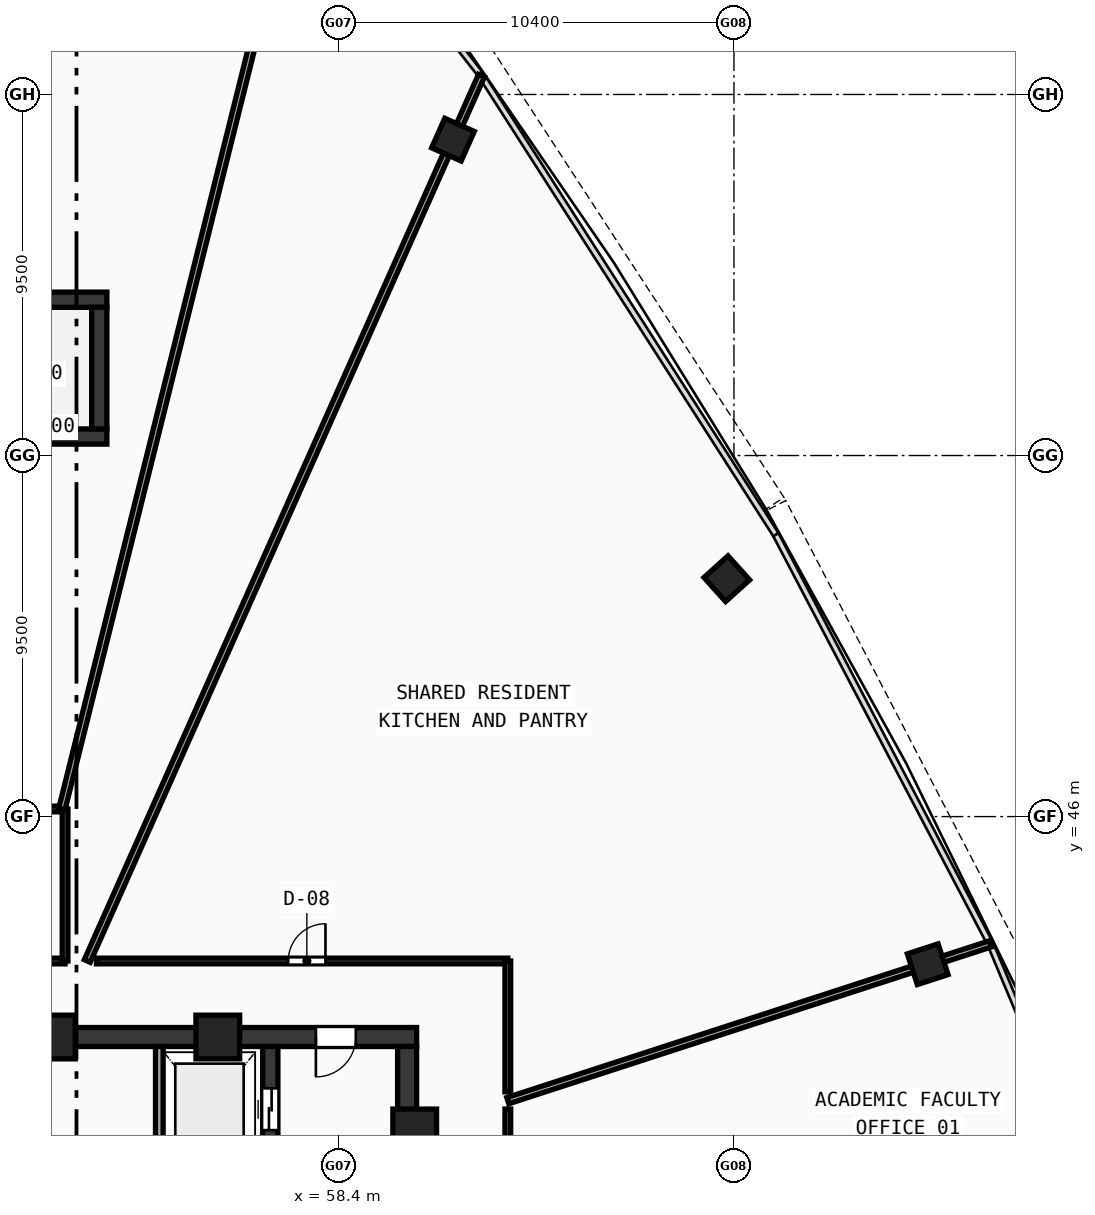
"""IFC4 building model, lengths in metres.
Left out: names, types, materials, properties, quantities, classifications, styles, units other than length and angle.
Written with IfcOpenShell. Run it as: python <this file> out.ifc"""

import sys

from ifc_helpers import new_model, si_unit, direction, frame, frame_2d, origin, origin_with_axes, origin_2d, place, context, subcontext, project, spatial, rectangle, hollow_rectangle, extrude, source, transform, mapped, element, fill, save


model = new_model("IFC4")
c1 = context("Model", 3, precision=1e-05, world=origin(), true_north=direction((0.0, 1.0)))
c2 = subcontext(c1, "Body", "Model", "MODEL_VIEW")
j1 = project(units=[si_unit("LENGTHUNIT", "METRE"), si_unit("PLANEANGLEUNIT", "RADIAN")], contexts=[c1])
p1 = place(None, origin())
s1 = spatial("IfcSite", under=j1, at=p1, CompositionType="ELEMENT")
p2 = place(p1, origin())
s2 = spatial("IfcBuilding", under=s1, at=p2, CompositionType="ELEMENT")
p3 = place(p2, frame((0.0, 0.0, 259.45)))
s3 = spatial("IfcBuildingStorey", under=s2, at=p3, CompositionType="ELEMENT", Elevation=259.45)
p4 = place(p3, frame((49.2, 40.2, 0.0), z_axis=(0.0, 0.0, 1.0), x_axis=(1.0, 0.0, 0.0)))
e1 = element("IfcWall", 1, at=p4, inside=s3, PredefinedType="SHEAR", context=c2, shape_type="SweptSolid", body=[
    extrude(rectangle(XDim=11.25, YDim=0.5, at=frame_2d((5.625, 0.0))), origin(), (0.0, 0.0, 1.0), 3.47),
])
p5 = place(p4, frame((8.6, 0.0, 0.0)))
e2 = element("IfcOpeningElement", 2, at=p5, cuts=e1, PredefinedType="OPENING", context=c2, shape_type="SweptSolid", body=[
    extrude(rectangle(XDim=1.05, YDim=2.1, at=frame_2d((0.525, 1.05))), frame((0.0, 0.26, 0.0), z_axis=(0.0, -1.0, 0.0), x_axis=(1.0, 0.0, 0.0)), (0.0, 0.0, 1.0), 0.52),
])
p6 = place(p3, frame((60.2, 27.75, 0.0), z_axis=(0.0, 0.0, 1.0), x_axis=(0.0, 1.0, 0.0)))
e3 = element("IfcWall", 3, at=p6, inside=s3, PredefinedType="SHEAR", context=c2, shape_type="SweptSolid", body=[
    extrude(rectangle(XDim=12.2, YDim=0.5, at=frame_2d((6.1, 0.0))), origin(), (0.0, 0.0, 1.0), 3.47),
])
p7 = place(p3, frame((56.6, 27.75, 0.0), z_axis=(0.0, 0.0, 1.0), x_axis=(0.0, 1.0, 0.0)))
e4 = element("IfcWall", 4, at=p7, inside=s3, PredefinedType="SHEAR", context=c2, shape_type="SweptSolid", body=[
    extrude(rectangle(XDim=12.2, YDim=0.4, at=frame_2d((6.1, 0.0))), origin(), (0.0, 0.0, 1.0), 3.47),
])
p8 = place(p7, frame((10.0, 0.0, 0.0)))
e5 = element("IfcOpeningElement", 5, at=p8, cuts=e4, PredefinedType="OPENING", context=c2, shape_type="SweptSolid", body=[
    extrude(rectangle(XDim=1.1, YDim=2.1, at=frame_2d((0.55, 1.05))), frame((0.0, 0.21, 0.0), z_axis=(0.0, -1.0, 0.0), x_axis=(1.0, 0.0, 0.0)), (0.0, 0.0, 1.0), 0.42),
])
p9 = place(p3, frame((43.8, 59.6, 0.0), z_axis=(0.0, 0.0, 1.0), x_axis=(1.0, 0.0, 0.0)))
e6 = element("IfcWall", 6, at=p9, inside=s3, PredefinedType="SHEAR", context=c2, shape_type="SweptSolid", body=[
    extrude(rectangle(XDim=8.5, YDim=0.4, at=frame_2d((4.25, 0.0))), origin(), (0.0, 0.0, 1.0), 3.47),
])
p10 = place(p3, frame((43.8, 56.0, 0.0), z_axis=(0.0, 0.0, 1.0), x_axis=(1.0, 0.0, 0.0)))
e7 = element("IfcWall", 7, at=p10, inside=s3, PredefinedType="SHEAR", context=c2, shape_type="SweptSolid", body=[
    extrude(rectangle(XDim=8.5, YDim=0.4, at=frame_2d((4.25, 0.0))), origin(), (0.0, 0.0, 1.0), 3.47),
])
p11 = place(p10, frame((0.62, 0.0, 0.0)))
e8 = element("IfcOpeningElement", 8, at=p11, cuts=e7, PredefinedType="OPENING", context=c2, shape_type="SweptSolid", body=[
    extrude(rectangle(XDim=1.05, YDim=2.1, at=frame_2d((0.525, 1.05))), frame((0.0, 0.21, 0.0), z_axis=(0.0, -1.0, 0.0), x_axis=(1.0, 0.0, 0.0)), (0.0, 0.0, 1.0), 0.42),
])
p12 = place(p3, frame((52.1, 56.2, 0.0), z_axis=(0.0, 0.0, 1.0), x_axis=(0.0, 1.0, 0.0)))
e9 = element("IfcWall", 9, at=p12, inside=s3, PredefinedType="SHEAR", context=c2, shape_type="SweptSolid", body=[
    extrude(rectangle(XDim=3.2, YDim=0.4, at=frame_2d((1.6, 0.0))), origin(), (0.0, 0.0, 1.0), 3.47),
])
m1 = source(origin(), c2, "Body", "SweptSolid", [
    extrude(hollow_rectangle(XDim=1.15, YDim=1.15, WallThickness=0.048, at=origin_2d()), origin(), (0.0, 0.0, 1.0), 3.73),
])
for number, where, z_axis, x_axis in (
    (10, (60.4, 37.729, -0.26), (0.0, 0.0, 1.0), (1.0, 0.0, 0.0)),
    (11, (55.219, 40.2, -0.26), (0.0, 0.0, 1.0), (1.0, 0.0, 0.0)),
    (12, (50.894, 40.2, -0.26), (0.0, 0.0, 1.0), (1.0, 0.0, 0.0)),
):
    element("IfcColumn", number, at=place(p3, frame(where, z_axis=z_axis, x_axis=x_axis)), inside=s3, PredefinedType="COLUMN", context=c2, shape_type="MappedRepresentation", body=[
        mapped(m1, transform((0.0, 0.0, 0.0), scale=1.0)),
    ])
m2 = source(origin(), c2, "Body", "SweptSolid", [
    extrude(hollow_rectangle(XDim=0.85, YDim=0.85, WallThickness=0.034, at=origin_2d()), origin(), (0.0, 0.0, 1.0), 3.73),
])
for number, where, z_axis, x_axis in (
    (13, (73.899, 42.115, -0.26), (0.0, 0.0, 1.0), (-0.309, 0.951, 0.0)),
    (14, (68.612, 52.259, -0.26), (0.0, 0.0, 1.0), (-0.669, 0.743, 0.0)),
    (15, (61.407, 63.812, -0.26), (0.0, 0.0, 1.0), (-0.914, 0.407, 0.0)),
):
    element("IfcColumn", number, at=place(p3, frame(where, z_axis=z_axis, x_axis=x_axis)), inside=s3, PredefinedType="COLUMN", context=c2, shape_type="MappedRepresentation", body=[
        mapped(m2, transform((0.0, 0.0, 0.0), scale=1.0)),
    ])
p13 = place(p3, frame((53.68, 36.65, 0.0), z_axis=(0.0, 0.0, 1.0), x_axis=(0.0, 1.0, 0.0)))
e16 = element("IfcWall", 16, at=p13, inside=s3, PredefinedType="SOLIDWALL", context=c2, shape_type="SweptSolid", body=[
    extrude(rectangle(XDim=3.3, YDim=0.2, at=frame_2d((1.65, 0.0))), origin(), (0.0, 0.0, 1.0), 3.47),
])
p14 = place(p3, frame((45.85, 42.2, 0.0), z_axis=(0.0, 0.0, 1.0), x_axis=(1.0, 0.0, 0.0)))
e17 = element("IfcWall", 17, at=p14, inside=s3, PredefinedType="PARTITIONING", context=c2, shape_type="SweptSolid", body=[
    extrude(rectangle(XDim=5.35, YDim=0.15, at=frame_2d((2.675, 0.0))), origin(), (0.0, 0.0, 1.0), 3.47),
])
p15 = place(p14, frame((1.4, 0.0, 0.0)))
e18 = element("IfcOpeningElement", 18, at=p15, cuts=e17, PredefinedType="OPENING", context=c2, shape_type="SweptSolid", body=[
    extrude(rectangle(XDim=0.94, YDim=2.1, at=frame_2d((0.47, 1.05))), frame((0.0, 0.085, 0.0), z_axis=(0.0, -1.0, 0.0), x_axis=(1.0, 0.0, 0.0)), (0.0, 0.0, 1.0), 0.17),
])
p16 = place(p3, frame((45.85, 46.2, 0.0), z_axis=(0.0, 0.0, 1.0), x_axis=(1.0, 0.0, 0.0)))
e19 = element("IfcWall", 19, at=p16, inside=s3, PredefinedType="PARTITIONING", context=c2, shape_type="SweptSolid", body=[
    extrude(rectangle(XDim=5.35, YDim=0.15, at=frame_2d((2.675, 0.0))), origin(), (0.0, 0.0, 1.0), 3.47),
])
p17 = place(p3, frame((51.2, 42.2, 0.0), z_axis=(0.0, 0.0, 1.0), x_axis=(0.0, 1.0, 0.0)))
e20 = element("IfcWall", 20, at=p17, inside=s3, PredefinedType="PARTITIONING", context=c2, shape_type="SweptSolid", body=[
    extrude(rectangle(XDim=4.0, YDim=0.15, at=frame_2d((2.0, 0.0))), origin(), (0.0, 0.0, 1.0), 3.47),
])
p18 = place(p3, frame((62.85, 38.525, 0.0), z_axis=(0.0, 0.0, 1.0), x_axis=(0.951055435747, 0.30902031994, 0.0)))
e21 = element("IfcWall", 21, at=p18, inside=s3, PredefinedType="PARTITIONING", context=c2, shape_type="SweptSolid", body=[
    extrude(rectangle(XDim=13.349, YDim=0.17, at=frame_2d((6.675, 0.0))), origin(), (0.0, 0.0, 1.0), 2.82),
])
p19 = place(p3, frame((51.784, 42.2, 0.0), z_axis=(0.0, 0.0, 1.0), x_axis=(0.406736188948, 0.913545659833, 0.0)))
e22 = element("IfcWall", 22, at=p19, inside=s3, PredefinedType="PARTITIONING", context=c2, shape_type="SweptSolid", body=[
    extrude(rectangle(XDim=25.501, YDim=0.17, at=frame_2d((12.75, 0.0))), origin(), (0.0, 0.0, 1.0), 2.82),
])
p20 = place(p3, frame((51.117, 46.2, 0.0), z_axis=(0.0, 0.0, 1.0), x_axis=(0.241915360039, 0.970297355751, 0.0)))
e23 = element("IfcWall", 23, at=p20, inside=s3, PredefinedType="PARTITIONING", context=c2, shape_type="SweptSolid", body=[
    extrude(rectangle(XDim=26.119, YDim=0.17, at=frame_2d((13.06, 0.0))), origin(), (0.0, 0.0, 1.0), 2.82),
])
p21 = place(p3, frame((52.025, 42.2, 0.0), z_axis=(0.0, 0.0, 1.0), x_axis=(1.0, 0.0, 0.0)))
e24 = element("IfcWall", 24, at=p21, inside=s3, PredefinedType="PARTITIONING", context=c2, shape_type="SweptSolid", body=[
    extrude(rectangle(XDim=10.825, YDim=0.15, at=frame_2d((5.413, 0.0))), origin(), (0.0, 0.0, 1.0), 2.82),
])
p22 = place(p21, frame((5.047, 0.0, 0.0)))
e25 = element("IfcOpeningElement", 25, at=p22, cuts=e24, PredefinedType="OPENING", context=c2, shape_type="SweptSolid", body=[
    extrude(rectangle(XDim=0.98, YDim=2.12, at=frame_2d((0.49, 1.06))), frame((0.0, 0.085, 0.0), z_axis=(0.0, -1.0, 0.0), x_axis=(1.0, 0.0, 0.0)), (0.0, 0.0, 1.0), 0.17),
])
p23 = place(p3, frame((62.85, 42.2, 0.0), z_axis=(0.0, 0.0, 1.0), x_axis=(0.0, -1.0, 0.0)))
e26 = element("IfcWall", 26, at=p23, inside=s3, PredefinedType="PARTITIONING", context=c2, shape_type="SweptSolid", body=[
    extrude(rectangle(XDim=3.444, YDim=0.15, at=frame_2d((1.722, 0.0))), origin(), (0.0, 0.0, 1.0), 3.12),
])
p24 = place(p3, frame((62.85, 38.305, 0.0), z_axis=(0.0, 0.0, 1.0), x_axis=(0.0, -1.0, 0.0)))
e27 = element("IfcWall", 27, at=p24, inside=s3, PredefinedType="PARTITIONING", context=c2, shape_type="SweptSolid", body=[
    extrude(rectangle(XDim=3.867, YDim=0.15, at=frame_2d((1.933, 0.0))), origin(), (0.0, 0.0, 1.0), 3.47),
])
p25 = place(p24, frame((1.473, 0.0, 0.0)))
e28 = element("IfcOpeningElement", 28, at=p25, cuts=e27, PredefinedType="OPENING", context=c2, shape_type="SweptSolid", body=[
    extrude(rectangle(XDim=0.92, YDim=2.1, at=frame_2d((0.46, 1.05))), frame((0.0, 0.085, 0.0), z_axis=(0.0, -1.0, 0.0), x_axis=(1.0, 0.0, 0.0)), (0.0, 0.0, 1.0), 0.17),
])
m3 = source(origin(), c2, "Body", "SweptSolid", [
    extrude(rectangle(XDim=1.05, YDim=2.1, at=frame_2d((0.525, 1.05))), frame((0.0, 0.025, 0.0), z_axis=(0.0, -1.0, 0.0), x_axis=(1.0, 0.0, 0.0)), (0.0, 0.0, 1.0), 0.05),
])
p26 = place(p5, frame((1.05, 0.0, 0.0), z_axis=(0.0, 0.0, 1.0), x_axis=(-1.0, 0.0, 0.0)))
e29 = element("IfcDoor", 29, at=p26, inside=s3, OperationType="SINGLE_SWING_RIGHT", PredefinedType="DOOR", context=c2, shape_type="MappedRepresentation", body=[
    mapped(m3, transform((0.0, 0.0, 0.0), scale=1.0)),
])
fill(e2, e29)
m4 = source(origin(), c2, "Body", "SweptSolid", [
    extrude(rectangle(XDim=1.1, YDim=2.1, at=frame_2d((0.55, 1.05))), frame((0.0, 0.025, 0.0), z_axis=(0.0, -1.0, 0.0), x_axis=(1.0, 0.0, 0.0)), (0.0, 0.0, 1.0), 0.05),
])
p27 = place(p8, origin_with_axes())
e30 = element("IfcDoor", 30, at=p27, inside=s3, OperationType="DOUBLE_DOOR_SLIDING", PredefinedType="DOOR", context=c2, shape_type="MappedRepresentation", body=[
    mapped(m4, transform((0.0, 0.0, 0.0), scale=1.0)),
])
fill(e5, e30)
m5 = source(origin(), c2, "Body", "SweptSolid", [
    extrude(rectangle(XDim=0.98, YDim=2.12, at=frame_2d((0.49, 1.06))), frame((0.0, 0.025, 0.0), z_axis=(0.0, -1.0, 0.0), x_axis=(1.0, 0.0, 0.0)), (0.0, 0.0, 1.0), 0.05),
])
p28 = place(p22, origin_with_axes())
e31 = element("IfcDoor", 31, at=p28, inside=s3, OperationType="SINGLE_SWING_RIGHT", PredefinedType="DOOR", context=c2, shape_type="MappedRepresentation", body=[
    mapped(m5, transform((0.0, 0.0, 0.0), scale=1.0)),
])
fill(e25, e31)
save(model, sys.argv[1])
